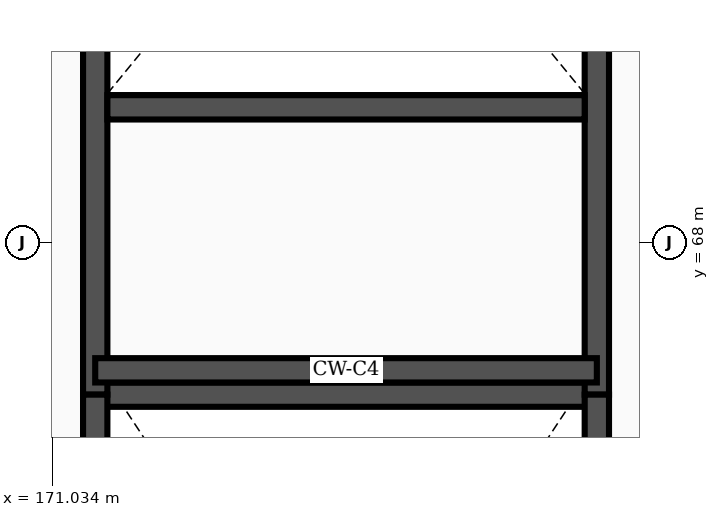
"""IFC4 building model, lengths in metres.
Left out: names, types, materials, properties, quantities, classifications, styles, units other than length and angle.
Written with IfcOpenShell. Run it as: python <this file> out.ifc"""

import sys

from ifc_helpers import new_model, si_unit, direction, frame, frame_2d, origin, place, context, subcontext, project, spatial, rectangle, extrude, element, save


model = new_model("IFC4")
c1 = context("Model", 3, precision=1e-05, world=origin(), true_north=direction((0.0, 1.0)))
c2 = subcontext(c1, "Body", "Model", "MODEL_VIEW")
j1 = project(units=[si_unit("LENGTHUNIT", "METRE"), si_unit("PLANEANGLEUNIT", "RADIAN")], contexts=[c1])
p1 = place(None, origin())
s1 = spatial("IfcSite", under=j1, at=p1, CompositionType="ELEMENT")
p2 = place(p1, origin())
s2 = spatial("IfcBuilding", under=s1, at=p2, CompositionType="ELEMENT")
p3 = place(p2, origin())
s3 = spatial("IfcBuildingStorey", under=s2, at=p3, CompositionType="ELEMENT", Elevation=0.0)
p4 = place(p3, frame((171.6, 66.0, 0.0), z_axis=(0.0, 0.0, 1.0), x_axis=(1.0, 0.0, 0.0)))
e1 = element("IfcWall", 1, at=p4, inside=s3, PredefinedType="SHEAR", context=c2, shape_type="SweptSolid", body=[
    extrude(rectangle(XDim=6.6, YDim=0.32, at=frame_2d((3.3, 0.0))), origin(), (0.0, 0.0, 1.0), 5.75),
])
for number, where, z_axis, x_axis in (
    (2, (171.6, 66.0, 0.0), (0.0, 0.0, 1.0), (0.0, 1.0, 0.0)),
    (3, (178.2, 66.0, 0.0), (0.0, 0.0, 1.0), (0.0, 1.0, 0.0)),
):
    element("IfcWall", number, at=place(p3, frame(where, z_axis=z_axis, x_axis=x_axis)), inside=s3, PredefinedType="SHEAR", context=c2, shape_type="SweptSolid", body=[
        extrude(rectangle(XDim=14.6, YDim=0.32, at=frame_2d((7.3, 0.0))), origin(), (0.0, 0.0, 1.0), 5.75),
    ])
p5 = place(p3, frame((171.76, 69.78, 0.0), z_axis=(0.0, 0.0, 1.0), x_axis=(1.0, 0.0, 0.0)))
e4 = element("IfcWall", 4, at=p5, inside=s3, PredefinedType="SHEAR", context=c2, shape_type="SweptSolid", body=[
    extrude(rectangle(XDim=6.28, YDim=0.32, at=frame_2d((3.14, 0.0))), origin(), (0.0, 0.0, 1.0), 5.75),
])
p6 = place(p3, frame((171.6, 66.32, 0.0), z_axis=(0.0, 0.0, 1.0), x_axis=(1.0, 0.0, 0.0)))
e5 = element("IfcWall", 5, at=p6, inside=s3, PredefinedType="SHEAR", context=c2, shape_type="SweptSolid", body=[
    extrude(rectangle(XDim=6.6, YDim=0.32, at=frame_2d((3.3, 0.0))), origin(), (0.0, 0.0, 1.0), 5.75),
])
p7 = place(p3, frame((171.6, 54.0, 0.0), z_axis=(0.0, 0.0, 1.0), x_axis=(0.0, 1.0, 0.0)))
e6 = element("IfcWall", 6, at=p7, inside=s3, PredefinedType="SHEAR", context=c2, shape_type="SweptSolid", body=[
    extrude(rectangle(XDim=12.0, YDim=0.32, at=frame_2d((6.0, 0.0))), origin(), (0.0, 0.0, 1.0), 5.75),
])
p8 = place(p7, frame((0.55, 0.0, 0.0)))
e7 = element("IfcOpeningElement", 7, at=p8, cuts=e6, PredefinedType="OPENING", context=c2, shape_type="SweptSolid", body=[
    extrude(rectangle(XDim=3.0, YDim=2.25, at=frame_2d((1.5, 1.125))), frame((0.0, 0.172, 0.0), z_axis=(0.0, -1.0, 0.0), x_axis=(1.0, 0.0, 0.0)), (0.0, 0.0, 1.0), 0.344),
])
p9 = place(p3, frame((178.2, 54.0, 0.0), z_axis=(0.0, 0.0, 1.0), x_axis=(0.0, 1.0, 0.0)))
e8 = element("IfcWall", 8, at=p9, inside=s3, PredefinedType="SHEAR", context=c2, shape_type="SweptSolid", body=[
    extrude(rectangle(XDim=12.0, YDim=0.32, at=frame_2d((6.0, 0.0))), origin(), (0.0, 0.0, 1.0), 5.75),
])
save(model, sys.argv[1])
